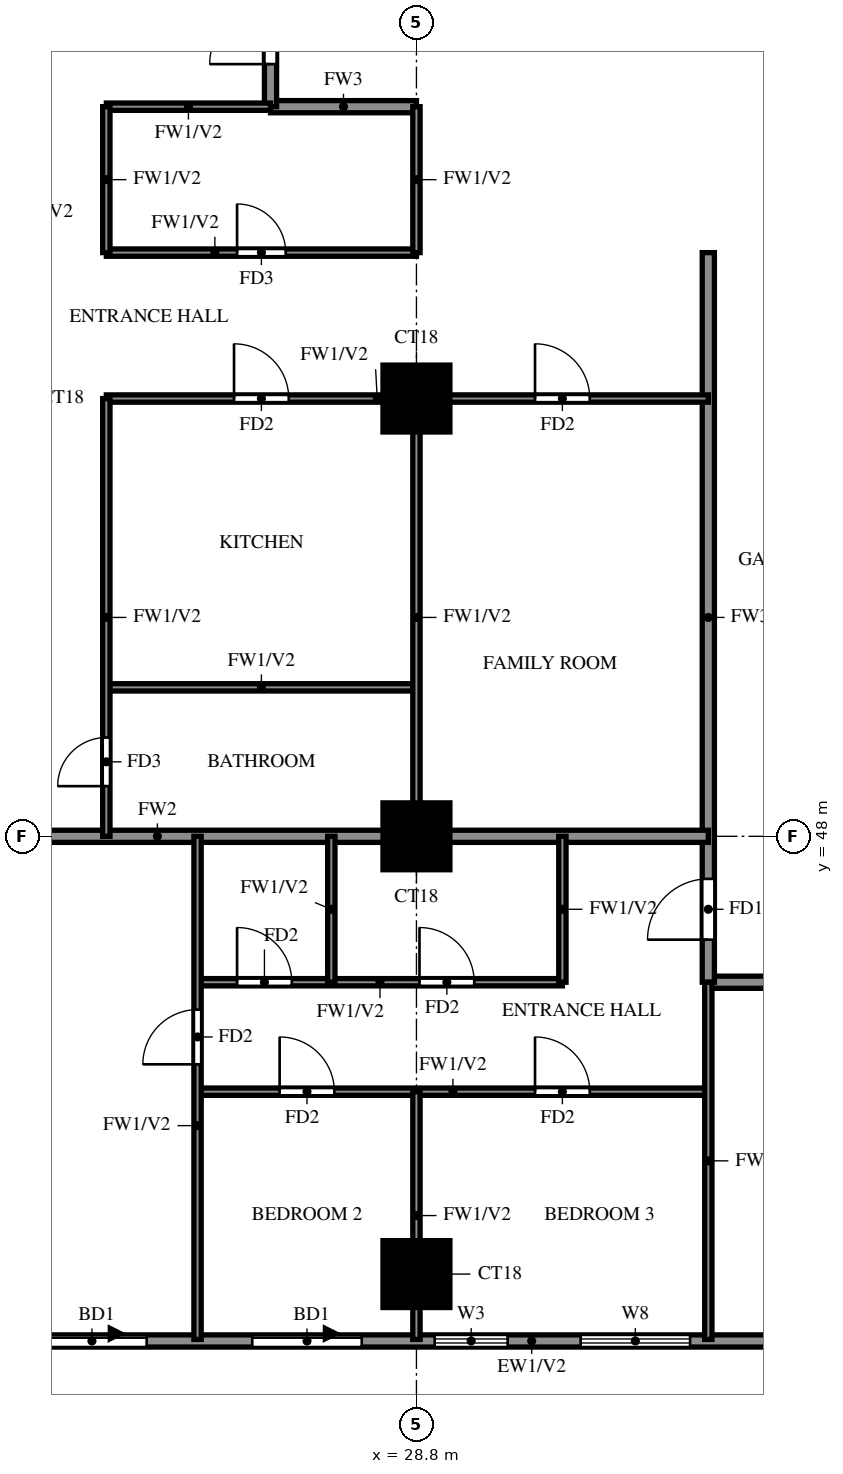
"""IFC4 building model, lengths in metres.
Left out: names, types, materials, properties, quantities, classifications, styles, units other than length and angle.
Written with IfcOpenShell. Run it as: python <this file> out.ifc"""

import sys

from ifc_helpers import new_model, si_unit, direction, frame, frame_2d, origin, origin_2d, place, context, subcontext, project, spatial, rectangle, extrude, source, transform, mapped, element, fill, save


model = new_model("IFC4")
c1 = context("Model", 3, precision=1e-05, world=origin(), true_north=direction((0.0, 1.0)))
c2 = subcontext(c1, "Body", "Model", "MODEL_VIEW")
j1 = project(units=[si_unit("LENGTHUNIT", "METRE"), si_unit("PLANEANGLEUNIT", "RADIAN")], contexts=[c1])
p1 = place(None, origin())
s1 = spatial("IfcSite", under=j1, at=p1, CompositionType="ELEMENT")
p2 = place(p1, origin())
s2 = spatial("IfcBuilding", under=s1, at=p2, CompositionType="ELEMENT")
p3 = place(p2, frame((0.0, 0.0, 113.0)))
s3 = spatial("IfcBuildingStorey", under=s2, at=p3, CompositionType="ELEMENT", Elevation=113.0)
m1 = source(origin(), c2, "Body", "SweptSolid", [
    extrude(rectangle(XDim=1.1, YDim=1.1, at=origin_2d()), origin(), (0.0, 0.0, 1.0), 3.2),
])
for number, where, z_axis, x_axis in (
    (1, (28.8, 40.8, 0.0), (0.0, 0.0, 1.0), (1.0, 0.0, 0.0)),
    (2, (28.8, 48.0, 0.0), (0.0, 0.0, 1.0), (1.0, 0.0, 0.0)),
    (3, (28.8, 55.2, 0.0), (0.0, 0.0, 1.0), (1.0, 0.0, 0.0)),
):
    element("IfcColumn", number, at=place(p3, frame(where, z_axis=z_axis, x_axis=x_axis)), inside=s3, PredefinedType="COLUMN", context=c2, shape_type="MappedRepresentation", body=[
        mapped(m1, transform((0.0, 0.0, 0.0))),
    ])
p4 = place(p3, frame((18.2, 39.7, 0.0), z_axis=(0.0, 0.0, 1.0), x_axis=(1.0, 0.0, 0.0)))
e4 = element("IfcWall", 4, at=p4, inside=s3, PredefinedType="SOLIDWALL", context=c2, shape_type="SweptSolid", body=[
    extrude(rectangle(XDim=23.8, YDim=0.2, at=frame_2d((11.9, 0.0))), origin(), (0.0, 0.0, 1.0), 3.2),
])
p5 = place(p4, frame((4.363, 0.0, 0.0)))
e5 = element("IfcOpeningElement", 5, at=p5, cuts=e4, PredefinedType="OPENING", context=c2, shape_type="SweptSolid", body=[
    extrude(rectangle(XDim=1.8, YDim=2.4, at=frame_2d((0.9, 1.2))), frame((0.0, 0.11, 0.0), z_axis=(0.0, -1.0, 0.0), x_axis=(1.0, 0.0, 0.0)), (0.0, 0.0, 1.0), 0.22),
])
p6 = place(p4, frame((7.9, 0.0, 0.0)))
e6 = element("IfcOpeningElement", 6, at=p6, cuts=e4, PredefinedType="OPENING", context=c2, shape_type="SweptSolid", body=[
    extrude(rectangle(XDim=1.8, YDim=2.4, at=frame_2d((0.9, 1.2))), frame((0.0, 0.11, 0.0), z_axis=(0.0, -1.0, 0.0), x_axis=(1.0, 0.0, 0.0)), (0.0, 0.0, 1.0), 0.22),
])
p7 = place(p4, frame((0.931, 0.0, 0.6)))
e7 = element("IfcOpeningElement", 7, at=p7, cuts=e4, PredefinedType="OPENING", context=c2, shape_type="SweptSolid", body=[
    extrude(rectangle(XDim=2.4, YDim=2.4, at=frame_2d((1.2, 1.2))), frame((0.0, 0.11, 0.0), z_axis=(0.0, -1.0, 0.0), x_axis=(1.0, 0.0, 0.0)), (0.0, 0.0, 1.0), 0.22),
])
p8 = place(p4, frame((10.9, 0.0, 0.6)))
e8 = element("IfcOpeningElement", 8, at=p8, cuts=e4, PredefinedType="OPENING", context=c2, shape_type="SweptSolid", body=[
    extrude(rectangle(XDim=1.2, YDim=2.4, at=frame_2d((0.6, 1.2))), frame((0.0, 0.11, 0.0), z_axis=(0.0, -1.0, 0.0), x_axis=(1.0, 0.0, 0.0)), (0.0, 0.0, 1.0), 0.22),
])
p9 = place(p4, frame((13.3, 0.0, 0.6)))
e9 = element("IfcOpeningElement", 9, at=p9, cuts=e4, PredefinedType="OPENING", context=c2, shape_type="SweptSolid", body=[
    extrude(rectangle(XDim=1.8, YDim=2.4, at=frame_2d((0.9, 1.2))), frame((0.0, 0.11, 0.0), z_axis=(0.0, -1.0, 0.0), x_axis=(1.0, 0.0, 0.0)), (0.0, 0.0, 1.0), 0.22),
])
p10 = place(p3, frame((33.6, 45.6, 0.0), z_axis=(0.0, 0.0, 1.0), x_axis=(1.0, 0.0, 0.0)))
e10 = element("IfcWall", 10, at=p10, inside=s3, PredefinedType="SOLIDWALL", context=c2, shape_type="SweptSolid", body=[
    extrude(rectangle(XDim=7.2, YDim=0.2, at=frame_2d((3.6, 0.0))), origin(), (0.0, 0.0, 1.0), 3.2),
])
p11 = place(p10, frame((3.15, 0.0, 0.0)))
e11 = element("IfcOpeningElement", 11, at=p11, cuts=e10, PredefinedType="OPENING", context=c2, shape_type="SweptSolid", body=[
    extrude(rectangle(XDim=0.9, YDim=2.1, at=frame_2d((0.45, 1.05))), frame((0.0, 0.11, 0.0), z_axis=(0.0, -1.0, 0.0), x_axis=(1.0, 0.0, 0.0)), (0.0, 0.0, 1.0), 0.22),
])
p12 = place(p3, frame((26.4, 60.0, 0.0), z_axis=(0.0, 0.0, 1.0), x_axis=(1.0, 0.0, 0.0)))
e12 = element("IfcWall", 12, at=p12, inside=s3, PredefinedType="SOLIDWALL", context=c2, shape_type="SweptSolid", body=[
    extrude(rectangle(XDim=2.4, YDim=0.2, at=frame_2d((1.2, 0.0))), origin(), (0.0, 0.0, 1.0), 3.2),
])
p13 = place(p3, frame((26.4, 60.0, 0.0), z_axis=(0.0, 0.0, 1.0), x_axis=(0.0, 1.0, 0.0)))
e13 = element("IfcWall", 13, at=p13, inside=s3, PredefinedType="SOLIDWALL", context=c2, shape_type="SweptSolid", body=[
    extrude(rectangle(XDim=9.6, YDim=0.2, at=frame_2d((4.8, 0.0))), origin(), (0.0, 0.0, 1.0), 3.2),
])
p14 = place(p13, frame((0.7, 0.0, 0.0)))
e14 = element("IfcOpeningElement", 14, at=p14, cuts=e13, PredefinedType="OPENING", context=c2, shape_type="SweptSolid", body=[
    extrude(rectangle(XDim=1.0, YDim=2.1, at=frame_2d((0.5, 1.05))), frame((0.0, 0.11, 0.0), z_axis=(0.0, -1.0, 0.0), x_axis=(1.0, 0.0, 0.0)), (0.0, 0.0, 1.0), 0.22),
])
p15 = place(p13, frame((3.1, 0.0, 0.0)))
e15 = element("IfcOpeningElement", 15, at=p15, cuts=e13, PredefinedType="OPENING", context=c2, shape_type="SweptSolid", body=[
    extrude(rectangle(XDim=1.0, YDim=2.1, at=frame_2d((0.5, 1.05))), frame((0.0, 0.11, 0.0), z_axis=(0.0, -1.0, 0.0), x_axis=(1.0, 0.0, 0.0)), (0.0, 0.0, 1.0), 0.22),
])
p16 = place(p3, frame((33.6, 45.6, 0.0), z_axis=(0.0, 0.0, 1.0), x_axis=(0.0, 1.0, 0.0)))
e16 = element("IfcWall", 16, at=p16, inside=s3, PredefinedType="SOLIDWALL", context=c2, shape_type="SweptSolid", body=[
    extrude(rectangle(XDim=12.0, YDim=0.2, at=frame_2d((6.0, 0.0))), origin(), (0.0, 0.0, 1.0), 3.2),
])
p17 = place(p16, frame((0.7, 0.0, 0.0)))
e17 = element("IfcOpeningElement", 17, at=p17, cuts=e16, PredefinedType="OPENING", context=c2, shape_type="SweptSolid", body=[
    extrude(rectangle(XDim=1.0, YDim=2.1, at=frame_2d((0.5, 1.05))), frame((0.0, 0.11, 0.0), z_axis=(0.0, -1.0, 0.0), x_axis=(1.0, 0.0, 0.0)), (0.0, 0.0, 1.0), 0.22),
])
p18 = place(p3, frame((14.525, 48.0, 0.0), z_axis=(0.0, 0.0, 1.0), x_axis=(1.0, 0.0, 0.0)))
e18 = element("IfcWall", 18, at=p18, inside=s3, PredefinedType="SOLIDWALL", context=c2, shape_type="SweptSolid", body=[
    extrude(rectangle(XDim=19.075, YDim=0.2, at=frame_2d((9.538, 0.0))), origin(), (0.0, 0.0, 1.0), 3.2),
])
p19 = place(p3, frame((25.2, 43.8, 0.0), z_axis=(0.0, 0.0, 1.0), x_axis=(1.0, 0.0, 0.0)))
e19 = element("IfcWall", 19, at=p19, inside=s3, PredefinedType="PARTITIONING", context=c2, shape_type="SweptSolid", body=[
    extrude(rectangle(XDim=8.4, YDim=0.12, at=frame_2d((4.2, 0.0))), origin(), (0.0, 0.0, 1.0), 3.2),
])
p20 = place(p19, frame((1.35, 0.0, 0.0)))
e20 = element("IfcOpeningElement", 20, at=p20, cuts=e19, PredefinedType="OPENING", context=c2, shape_type="SweptSolid", body=[
    extrude(rectangle(XDim=0.9, YDim=2.1, at=frame_2d((0.45, 1.05))), frame((0.0, 0.07, 0.0), z_axis=(0.0, -1.0, 0.0), x_axis=(1.0, 0.0, 0.0)), (0.0, 0.0, 1.0), 0.14),
])
p21 = place(p19, frame((5.55, 0.0, 0.0)))
e21 = element("IfcOpeningElement", 21, at=p21, cuts=e19, PredefinedType="OPENING", context=c2, shape_type="SweptSolid", body=[
    extrude(rectangle(XDim=0.9, YDim=2.1, at=frame_2d((0.45, 1.05))), frame((0.0, 0.07, 0.0), z_axis=(0.0, -1.0, 0.0), x_axis=(1.0, 0.0, 0.0)), (0.0, 0.0, 1.0), 0.14),
])
p22 = place(p3, frame((25.2, 45.6, 0.0), z_axis=(0.0, 0.0, 1.0), x_axis=(1.0, 0.0, 0.0)))
e22 = element("IfcWall", 22, at=p22, inside=s3, PredefinedType="PARTITIONING", context=c2, shape_type="SweptSolid", body=[
    extrude(rectangle(XDim=6.0, YDim=0.12, at=frame_2d((3.0, 0.0))), origin(), (0.0, 0.0, 1.0), 3.2),
])
p23 = place(p22, frame((0.65, 0.0, 0.0)))
e23 = element("IfcOpeningElement", 23, at=p23, cuts=e22, PredefinedType="OPENING", context=c2, shape_type="SweptSolid", body=[
    extrude(rectangle(XDim=0.9, YDim=2.1, at=frame_2d((0.45, 1.05))), frame((0.0, 0.07, 0.0), z_axis=(0.0, -1.0, 0.0), x_axis=(1.0, 0.0, 0.0)), (0.0, 0.0, 1.0), 0.14),
])
p24 = place(p22, frame((3.65, 0.0, 0.0)))
e24 = element("IfcOpeningElement", 24, at=p24, cuts=e22, PredefinedType="OPENING", context=c2, shape_type="SweptSolid", body=[
    extrude(rectangle(XDim=0.9, YDim=2.1, at=frame_2d((0.45, 1.05))), frame((0.0, 0.07, 0.0), z_axis=(0.0, -1.0, 0.0), x_axis=(1.0, 0.0, 0.0)), (0.0, 0.0, 1.0), 0.14),
])
p25 = place(p3, frame((23.7, 50.45, 0.0), z_axis=(0.0, 0.0, 1.0), x_axis=(1.0, 0.0, 0.0)))
e25 = element("IfcWall", 25, at=p25, inside=s3, PredefinedType="PARTITIONING", context=c2, shape_type="SweptSolid", body=[
    extrude(rectangle(XDim=5.1, YDim=0.12, at=frame_2d((2.55, 0.0))), origin(), (0.0, 0.0, 1.0), 3.2),
])
p26 = place(p3, frame((23.7, 55.2, 0.0), z_axis=(0.0, 0.0, 1.0), x_axis=(1.0, 0.0, 0.0)))
e26 = element("IfcWall", 26, at=p26, inside=s3, PredefinedType="PARTITIONING", context=c2, shape_type="SweptSolid", body=[
    extrude(rectangle(XDim=9.9, YDim=0.12, at=frame_2d((4.95, 0.0))), origin(), (0.0, 0.0, 1.0), 3.2),
])
p27 = place(p26, frame((2.1, 0.0, 0.0)))
e27 = element("IfcOpeningElement", 27, at=p27, cuts=e26, PredefinedType="OPENING", context=c2, shape_type="SweptSolid", body=[
    extrude(rectangle(XDim=0.9, YDim=2.1, at=frame_2d((0.45, 1.05))), frame((0.0, 0.07, 0.0), z_axis=(0.0, -1.0, 0.0), x_axis=(1.0, 0.0, 0.0)), (0.0, 0.0, 1.0), 0.14),
])
p28 = place(p26, frame((7.05, 0.0, 0.0)))
e28 = element("IfcOpeningElement", 28, at=p28, cuts=e26, PredefinedType="OPENING", context=c2, shape_type="SweptSolid", body=[
    extrude(rectangle(XDim=0.9, YDim=2.1, at=frame_2d((0.45, 1.05))), frame((0.0, 0.07, 0.0), z_axis=(0.0, -1.0, 0.0), x_axis=(1.0, 0.0, 0.0)), (0.0, 0.0, 1.0), 0.14),
])
p29 = place(p3, frame((23.7, 57.6, 0.0), z_axis=(0.0, 0.0, 1.0), x_axis=(1.0, 0.0, 0.0)))
e29 = element("IfcWall", 29, at=p29, inside=s3, PredefinedType="PARTITIONING", context=c2, shape_type="SweptSolid", body=[
    extrude(rectangle(XDim=5.1, YDim=0.12, at=frame_2d((2.55, 0.0))), origin(), (0.0, 0.0, 1.0), 3.2),
])
p30 = place(p29, frame((2.15, 0.0, 0.0)))
e30 = element("IfcOpeningElement", 30, at=p30, cuts=e29, PredefinedType="OPENING", context=c2, shape_type="SweptSolid", body=[
    extrude(rectangle(XDim=0.8, YDim=2.1, at=frame_2d((0.4, 1.05))), frame((0.0, 0.07, 0.0), z_axis=(0.0, -1.0, 0.0), x_axis=(1.0, 0.0, 0.0)), (0.0, 0.0, 1.0), 0.14),
])
p31 = place(p3, frame((23.7, 60.0, 0.0), z_axis=(0.0, 0.0, 1.0), x_axis=(1.0, 0.0, 0.0)))
e31 = element("IfcWall", 31, at=p31, inside=s3, PredefinedType="PARTITIONING", context=c2, shape_type="SweptSolid", body=[
    extrude(rectangle(XDim=2.7, YDim=0.12, at=frame_2d((1.35, 0.0))), origin(), (0.0, 0.0, 1.0), 3.2),
])
p32 = place(p3, frame((23.7, 48.0, 0.0), z_axis=(0.0, 0.0, 1.0), x_axis=(0.0, 1.0, 0.0)))
e32 = element("IfcWall", 32, at=p32, inside=s3, PredefinedType="PARTITIONING", context=c2, shape_type="SweptSolid", body=[
    extrude(rectangle(XDim=7.2, YDim=0.12, at=frame_2d((3.6, 0.0))), origin(), (0.0, 0.0, 1.0), 3.2),
])
p33 = place(p32, frame((0.825, 0.0, 0.0)))
e33 = element("IfcOpeningElement", 33, at=p33, cuts=e32, PredefinedType="OPENING", context=c2, shape_type="SweptSolid", body=[
    extrude(rectangle(XDim=0.8, YDim=2.1, at=frame_2d((0.4, 1.05))), frame((0.0, 0.07, 0.0), z_axis=(0.0, -1.0, 0.0), x_axis=(1.0, 0.0, 0.0)), (0.0, 0.0, 1.0), 0.14),
])
p34 = place(p3, frame((23.7, 57.6, 0.0), z_axis=(0.0, 0.0, 1.0), x_axis=(0.0, 1.0, 0.0)))
e34 = element("IfcWall", 34, at=p34, inside=s3, PredefinedType="PARTITIONING", context=c2, shape_type="SweptSolid", body=[
    extrude(rectangle(XDim=2.4, YDim=0.12, at=frame_2d((1.2, 0.0))), origin(), (0.0, 0.0, 1.0), 3.2),
])
p35 = place(p3, frame((25.2, 39.725, 0.0), z_axis=(0.0, 0.0, 1.0), x_axis=(0.0, 1.0, 0.0)))
e35 = element("IfcWall", 35, at=p35, inside=s3, PredefinedType="PARTITIONING", context=c2, shape_type="SweptSolid", body=[
    extrude(rectangle(XDim=8.275, YDim=0.12, at=frame_2d((4.137, 0.0))), origin(), (0.0, 0.0, 1.0), 3.2),
])
p36 = place(p35, frame((4.525, 0.0, 0.0)))
e36 = element("IfcOpeningElement", 36, at=p36, cuts=e35, PredefinedType="OPENING", context=c2, shape_type="SweptSolid", body=[
    extrude(rectangle(XDim=0.9, YDim=2.1, at=frame_2d((0.45, 1.05))), frame((0.0, 0.07, 0.0), z_axis=(0.0, -1.0, 0.0), x_axis=(1.0, 0.0, 0.0)), (0.0, 0.0, 1.0), 0.14),
])
p37 = place(p3, frame((27.4, 45.6, 0.0), z_axis=(0.0, 0.0, 1.0), x_axis=(0.0, 1.0, 0.0)))
e37 = element("IfcWall", 37, at=p37, inside=s3, PredefinedType="PARTITIONING", context=c2, shape_type="SweptSolid", body=[
    extrude(rectangle(XDim=2.4, YDim=0.12, at=frame_2d((1.2, 0.0))), origin(), (0.0, 0.0, 1.0), 3.2),
])
p38 = place(p3, frame((28.8, 39.725, 0.0), z_axis=(0.0, 0.0, 1.0), x_axis=(0.0, 1.0, 0.0)))
e38 = element("IfcWall", 38, at=p38, inside=s3, PredefinedType="PARTITIONING", context=c2, shape_type="SweptSolid", body=[
    extrude(rectangle(XDim=4.075, YDim=0.12, at=frame_2d((2.038, 0.0))), origin(), (0.0, 0.0, 1.0), 3.2),
])
p39 = place(p3, frame((28.8, 48.0, 0.0), z_axis=(0.0, 0.0, 1.0), x_axis=(0.0, 1.0, 0.0)))
e39 = element("IfcWall", 39, at=p39, inside=s3, PredefinedType="PARTITIONING", context=c2, shape_type="SweptSolid", body=[
    extrude(rectangle(XDim=7.2, YDim=0.12, at=frame_2d((3.6, 0.0))), origin(), (0.0, 0.0, 1.0), 3.2),
])
for number, where, z_axis, x_axis in (
    (40, (28.8, 57.6, 0.0), (0.0, 0.0, 1.0), (0.0, 1.0, 0.0)),
    (41, (31.2, 45.6, 0.0), (0.0, 0.0, 1.0), (0.0, 1.0, 0.0)),
):
    element("IfcWall", number, at=place(p3, frame(where, z_axis=z_axis, x_axis=x_axis)), inside=s3, PredefinedType="PARTITIONING", context=c2, shape_type="SweptSolid", body=[
        extrude(rectangle(XDim=2.4, YDim=0.12, at=frame_2d((1.2, 0.0))), origin(), (0.0, 0.0, 1.0), 3.2),
    ])
p40 = place(p3, frame((33.6, 39.725, 0.0), z_axis=(0.0, 0.0, 1.0), x_axis=(0.0, 1.0, 0.0)))
e42 = element("IfcWall", 42, at=p40, inside=s3, PredefinedType="PARTITIONING", context=c2, shape_type="SweptSolid", body=[
    extrude(rectangle(XDim=5.875, YDim=0.12, at=frame_2d((2.938, 0.0))), origin(), (0.0, 0.0, 1.0), 3.2),
])
p41 = place(p5, origin())
e43 = element("IfcDoor", 43, at=p41, inside=s3, OperationType="DOUBLE_DOOR_SLIDING", PredefinedType="DOOR", context=c2, shape_type="SweptSolid", body=[
    extrude(rectangle(XDim=1.8, YDim=2.4, at=frame_2d((0.9, 1.2))), frame((0.0, 0.025, 0.0), z_axis=(0.0, -1.0, 0.0), x_axis=(1.0, 0.0, 0.0)), (0.0, 0.0, 1.0), 0.05),
])
fill(e5, e43)
p42 = place(p6, origin())
e44 = element("IfcDoor", 44, at=p42, inside=s3, OperationType="DOUBLE_DOOR_SLIDING", PredefinedType="DOOR", context=c2, shape_type="SweptSolid", body=[
    extrude(rectangle(XDim=1.8, YDim=2.4, at=frame_2d((0.9, 1.2))), frame((0.0, 0.025, 0.0), z_axis=(0.0, -1.0, 0.0), x_axis=(1.0, 0.0, 0.0)), (0.0, 0.0, 1.0), 0.05),
])
fill(e6, e44)
p43 = place(p8, origin())
e45 = element("IfcWindow", 45, at=p43, inside=s3, PartitioningType="SINGLE_PANEL", PredefinedType="WINDOW", context=c2, shape_type="SweptSolid", body=[
    extrude(rectangle(XDim=1.2, YDim=2.4, at=frame_2d((0.6, 1.2))), frame((0.0, 0.03, 0.0), z_axis=(0.0, -1.0, 0.0), x_axis=(1.0, 0.0, 0.0)), (0.0, 0.0, 1.0), 0.06),
])
fill(e8, e45)
p44 = place(p9, origin())
e46 = element("IfcWindow", 46, at=p44, inside=s3, PartitioningType="DOUBLE_PANEL_VERTICAL", PredefinedType="WINDOW", context=c2, shape_type="SweptSolid", body=[
    extrude(rectangle(XDim=1.8, YDim=2.4, at=frame_2d((0.9, 1.2))), frame((0.0, 0.03, 0.0), z_axis=(0.0, -1.0, 0.0), x_axis=(1.0, 0.0, 0.0)), (0.0, 0.0, 1.0), 0.06),
])
fill(e9, e46)
p45 = place(p17, origin())
e47 = element("IfcDoor", 47, at=p45, inside=s3, OperationType="SINGLE_SWING_LEFT", PredefinedType="DOOR", context=c2, shape_type="SweptSolid", body=[
    extrude(rectangle(XDim=1.0, YDim=2.1, at=frame_2d((0.5, 1.05))), frame((0.0, 0.025, 0.0), z_axis=(0.0, -1.0, 0.0), x_axis=(1.0, 0.0, 0.0)), (0.0, 0.0, 1.0), 0.05),
])
fill(e17, e47)
p46 = place(p36, origin())
e48 = element("IfcDoor", 48, at=p46, inside=s3, OperationType="SINGLE_SWING_RIGHT", PredefinedType="DOOR", context=c2, shape_type="SweptSolid", body=[
    extrude(rectangle(XDim=0.9, YDim=2.1, at=frame_2d((0.45, 1.05))), frame((0.0, 0.025, 0.0), z_axis=(0.0, -1.0, 0.0), x_axis=(1.0, 0.0, 0.0)), (0.0, 0.0, 1.0), 0.05),
])
fill(e36, e48)
p47 = place(p20, origin())
e49 = element("IfcDoor", 49, at=p47, inside=s3, OperationType="SINGLE_SWING_LEFT", PredefinedType="DOOR", context=c2, shape_type="SweptSolid", body=[
    extrude(rectangle(XDim=0.9, YDim=2.1, at=frame_2d((0.45, 1.05))), frame((0.0, 0.025, 0.0), z_axis=(0.0, -1.0, 0.0), x_axis=(1.0, 0.0, 0.0)), (0.0, 0.0, 1.0), 0.05),
])
fill(e20, e49)
p48 = place(p21, origin())
e50 = element("IfcDoor", 50, at=p48, inside=s3, OperationType="SINGLE_SWING_LEFT", PredefinedType="DOOR", context=c2, shape_type="SweptSolid", body=[
    extrude(rectangle(XDim=0.9, YDim=2.1, at=frame_2d((0.45, 1.05))), frame((0.0, 0.025, 0.0), z_axis=(0.0, -1.0, 0.0), x_axis=(1.0, 0.0, 0.0)), (0.0, 0.0, 1.0), 0.05),
])
fill(e21, e50)
p49 = place(p23, origin())
e51 = element("IfcDoor", 51, at=p49, inside=s3, OperationType="SINGLE_SWING_RIGHT", PredefinedType="DOOR", context=c2, shape_type="SweptSolid", body=[
    extrude(rectangle(XDim=0.9, YDim=2.1, at=frame_2d((0.45, 1.05))), frame((0.0, 0.025, 0.0), z_axis=(0.0, -1.0, 0.0), x_axis=(1.0, 0.0, 0.0)), (0.0, 0.0, 1.0), 0.05),
])
fill(e23, e51)
p50 = place(p24, origin())
e52 = element("IfcDoor", 52, at=p50, inside=s3, OperationType="SINGLE_SWING_LEFT", PredefinedType="DOOR", context=c2, shape_type="SweptSolid", body=[
    extrude(rectangle(XDim=0.9, YDim=2.1, at=frame_2d((0.45, 1.05))), frame((0.0, 0.025, 0.0), z_axis=(0.0, -1.0, 0.0), x_axis=(1.0, 0.0, 0.0)), (0.0, 0.0, 1.0), 0.05),
])
fill(e24, e52)
p51 = place(p14, origin())
e53 = element("IfcDoor", 53, at=p51, inside=s3, OperationType="SINGLE_SWING_RIGHT", PredefinedType="DOOR", context=c2, shape_type="SweptSolid", body=[
    extrude(rectangle(XDim=1.0, YDim=2.1, at=frame_2d((0.5, 1.05))), frame((0.0, 0.025, 0.0), z_axis=(0.0, -1.0, 0.0), x_axis=(1.0, 0.0, 0.0)), (0.0, 0.0, 1.0), 0.05),
])
fill(e14, e53)
p52 = place(p33, origin())
e54 = element("IfcDoor", 54, at=p52, inside=s3, OperationType="SINGLE_SWING_LEFT", PredefinedType="DOOR", context=c2, shape_type="SweptSolid", body=[
    extrude(rectangle(XDim=0.8, YDim=2.1, at=frame_2d((0.4, 1.05))), frame((0.0, 0.025, 0.0), z_axis=(0.0, -1.0, 0.0), x_axis=(1.0, 0.0, 0.0)), (0.0, 0.0, 1.0), 0.05),
])
fill(e33, e54)
p53 = place(p27, origin())
e55 = element("IfcDoor", 55, at=p53, inside=s3, OperationType="SINGLE_SWING_LEFT", PredefinedType="DOOR", context=c2, shape_type="SweptSolid", body=[
    extrude(rectangle(XDim=0.9, YDim=2.1, at=frame_2d((0.45, 1.05))), frame((0.0, 0.025, 0.0), z_axis=(0.0, -1.0, 0.0), x_axis=(1.0, 0.0, 0.0)), (0.0, 0.0, 1.0), 0.05),
])
fill(e27, e55)
p54 = place(p30, origin())
e56 = element("IfcDoor", 56, at=p54, inside=s3, OperationType="SINGLE_SWING_RIGHT", PredefinedType="DOOR", context=c2, shape_type="SweptSolid", body=[
    extrude(rectangle(XDim=0.8, YDim=2.1, at=frame_2d((0.4, 1.05))), frame((0.0, 0.025, 0.0), z_axis=(0.0, -1.0, 0.0), x_axis=(1.0, 0.0, 0.0)), (0.0, 0.0, 1.0), 0.05),
])
fill(e30, e56)
p55 = place(p28, origin())
e57 = element("IfcDoor", 57, at=p55, inside=s3, OperationType="SINGLE_SWING_LEFT", PredefinedType="DOOR", context=c2, shape_type="SweptSolid", body=[
    extrude(rectangle(XDim=0.9, YDim=2.1, at=frame_2d((0.45, 1.05))), frame((0.0, 0.025, 0.0), z_axis=(0.0, -1.0, 0.0), x_axis=(1.0, 0.0, 0.0)), (0.0, 0.0, 1.0), 0.05),
])
fill(e28, e57)
save(model, sys.argv[1])
